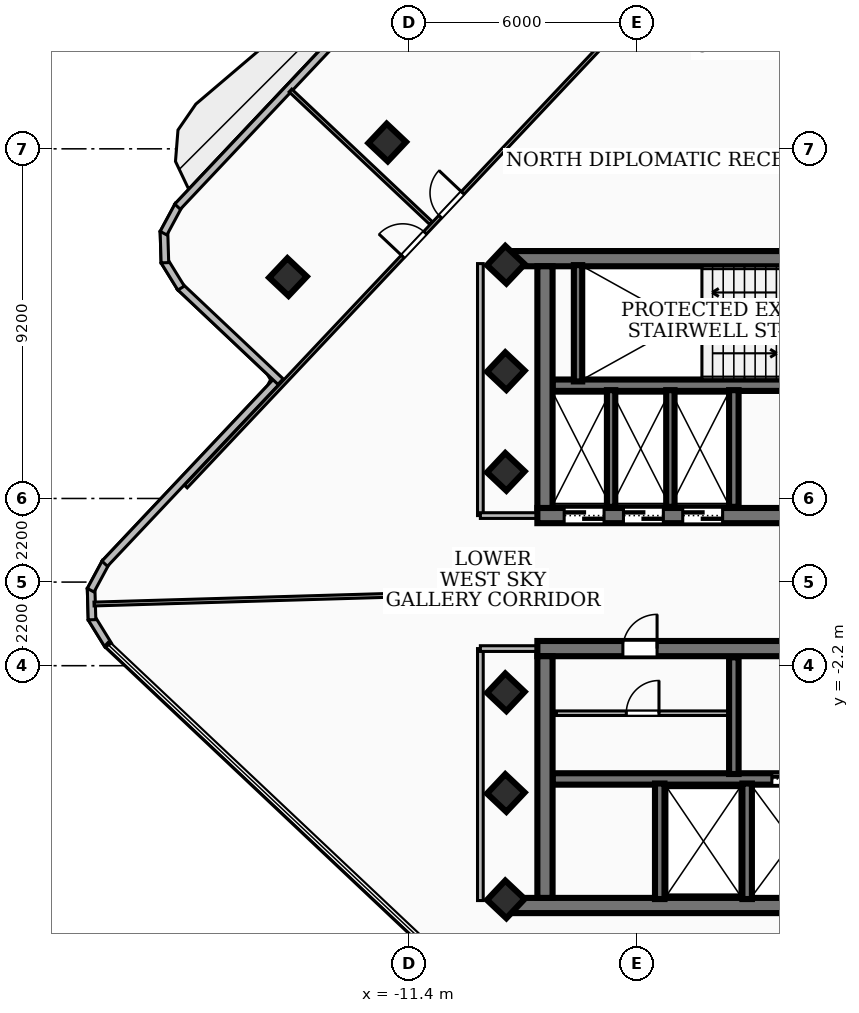
"""IFC4 building model, lengths in metres.
Left out: names, types, materials, properties, quantities, classifications, styles, units other than length and angle.
Written with IfcOpenShell. Run it as: python <this file> out.ifc"""

import sys

from ifc_helpers import new_model, si_unit, direction, frame, frame_2d, origin, origin_2d, place, context, subcontext, project, spatial, rectangle, extrude, element, fill, save


model = new_model("IFC4")
c1 = context("Model", 3, precision=1e-05, world=origin(), true_north=direction((0.0, 1.0)))
c2 = subcontext(c1, "Body", "Model", "MODEL_VIEW")
j1 = project(units=[si_unit("LENGTHUNIT", "METRE"), si_unit("PLANEANGLEUNIT", "RADIAN")], contexts=[c1])
p1 = place(None, origin())
s1 = spatial("IfcSite", under=j1, at=p1, CompositionType="ELEMENT")
p2 = place(p1, origin())
s2 = spatial("IfcBuilding", under=s1, at=p2, CompositionType="ELEMENT")
p3 = place(p2, frame((0.0, 0.0, 244.08)))
s3 = spatial("IfcBuildingStorey", under=s2, at=p3, CompositionType="ELEMENT", Elevation=244.08)
p4 = place(p3, frame((-8.78, 8.51, 0.0), z_axis=(0.0, 0.0, 1.0), x_axis=(1.0, 0.0, 0.0)))
e1 = element("IfcWall", 1, at=p4, inside=s3, PredefinedType="SHEAR", context=c2, shape_type="SweptSolid", body=[
    extrude(rectangle(XDim=17.56, YDim=0.4, at=frame_2d((8.78, 0.0))), origin(), (0.0, 0.0, 1.0), 3.16),
])
p5 = place(p3, frame((8.02, 1.75, 0.0), z_axis=(0.0, 0.0, 1.0), x_axis=(-1.0, 0.0, 0.0)))
e2 = element("IfcWall", 2, at=p5, inside=s3, PredefinedType="SHEAR", context=c2, shape_type="SweptSolid", body=[
    extrude(rectangle(XDim=16.04, YDim=0.4, at=frame_2d((8.02, 0.0))), origin(), (0.0, 0.0, 1.0), 3.16),
])
p6 = place(p5, frame((7.45, 0.0, 0.0)))
e3 = element("IfcOpeningElement", 3, at=p6, cuts=e2, PredefinedType="OPENING", context=c2, shape_type="SweptSolid", body=[
    extrude(rectangle(XDim=1.0, YDim=2.1, at=frame_2d((0.5, 1.05))), frame((0.0, 0.21, 0.0), z_axis=(0.0, -1.0, 0.0), x_axis=(1.0, 0.0, 0.0)), (0.0, 0.0, 1.0), 0.42),
])
p7 = place(p5, frame((14.285, 0.0, 0.0)))
e4 = element("IfcOpeningElement", 4, at=p7, cuts=e2, PredefinedType="OPENING", context=c2, shape_type="SweptSolid", body=[
    extrude(rectangle(XDim=1.05, YDim=2.15, at=frame_2d((0.525, 1.075))), frame((0.0, 0.21, 0.0), z_axis=(0.0, -1.0, 0.0), x_axis=(1.0, 0.0, 0.0)), (0.0, 0.0, 1.0), 0.42),
])
p8 = place(p5, frame((12.725, 0.0, 0.0)))
e5 = element("IfcOpeningElement", 5, at=p8, cuts=e2, PredefinedType="OPENING", context=c2, shape_type="SweptSolid", body=[
    extrude(rectangle(XDim=1.05, YDim=2.15, at=frame_2d((0.525, 1.075))), frame((0.0, 0.21, 0.0), z_axis=(0.0, -1.0, 0.0), x_axis=(1.0, 0.0, 0.0)), (0.0, 0.0, 1.0), 0.42),
])
p9 = place(p5, frame((11.165, 0.0, 0.0)))
e6 = element("IfcOpeningElement", 6, at=p9, cuts=e2, PredefinedType="OPENING", context=c2, shape_type="SweptSolid", body=[
    extrude(rectangle(XDim=1.05, YDim=2.15, at=frame_2d((0.525, 1.075))), frame((0.0, 0.21, 0.0), z_axis=(0.0, -1.0, 0.0), x_axis=(1.0, 0.0, 0.0)), (0.0, 0.0, 1.0), 0.42),
])
p10 = place(p5, frame((3.85, 0.0, 0.0)))
e7 = element("IfcOpeningElement", 7, at=p10, cuts=e2, PredefinedType="OPENING", context=c2, shape_type="SweptSolid", body=[
    extrude(rectangle(XDim=0.9, YDim=2.06, at=frame_2d((0.45, 1.03))), frame((0.0, 0.21, 0.0), z_axis=(0.0, -1.0, 0.0), x_axis=(1.0, 0.0, 0.0)), (0.0, 0.0, 1.0), 0.42),
])
p11 = place(p5, frame((2.35, 0.0, 0.0)))
e8 = element("IfcOpeningElement", 8, at=p11, cuts=e2, PredefinedType="OPENING", context=c2, shape_type="SweptSolid", body=[
    extrude(rectangle(XDim=0.9, YDim=2.06, at=frame_2d((0.45, 1.03))), frame((0.0, 0.21, 0.0), z_axis=(0.0, -1.0, 0.0), x_axis=(1.0, 0.0, 0.0)), (0.0, 0.0, 1.0), 0.42),
])
p12 = place(p5, frame((0.8, 0.0, 0.0)))
e9 = element("IfcOpeningElement", 9, at=p12, cuts=e2, PredefinedType="OPENING", context=c2, shape_type="SweptSolid", body=[
    extrude(rectangle(XDim=0.9, YDim=2.06, at=frame_2d((0.45, 1.03))), frame((0.0, 0.21, 0.0), z_axis=(0.0, -1.0, 0.0), x_axis=(1.0, 0.0, 0.0)), (0.0, 0.0, 1.0), 0.42),
])
p13 = place(p3, frame((-7.82, 1.95, 0.0), z_axis=(0.0, 0.0, 1.0), x_axis=(0.0, 1.0, 0.0)))
e10 = element("IfcWall", 10, at=p13, inside=s3, PredefinedType="SHEAR", context=c2, shape_type="SweptSolid", body=[
    extrude(rectangle(XDim=6.36, YDim=0.4, at=frame_2d((3.18, 0.0))), origin(), (0.0, 0.0, 1.0), 3.16),
])
p14 = place(p3, frame((7.62, 5.18, 0.0), z_axis=(0.0, 0.0, 1.0), x_axis=(-1.0, 0.0, 0.0)))
e11 = element("IfcWall", 11, at=p14, inside=s3, PredefinedType="SOLIDWALL", context=c2, shape_type="SweptSolid", body=[
    extrude(rectangle(XDim=15.24, YDim=0.3, at=frame_2d((7.62, 0.0))), origin(), (0.0, 0.0, 1.0), 3.16),
])
p15 = place(p14, frame((5.77, 0.0, 0.0)))
e12 = element("IfcOpeningElement", 12, at=p15, cuts=e11, PredefinedType="OPENING", context=c2, shape_type="SweptSolid", body=[
    extrude(rectangle(XDim=1.1, YDim=2.15, at=frame_2d((0.55, 1.075))), frame((0.0, 0.16, 0.0), z_axis=(0.0, -1.0, 0.0), x_axis=(1.0, 0.0, 0.0)), (0.0, 0.0, 1.0), 0.32),
])
p16 = place(p14, frame((2.97, 0.0, 0.0)))
e13 = element("IfcOpeningElement", 13, at=p16, cuts=e11, PredefinedType="OPENING", context=c2, shape_type="SweptSolid", body=[
    extrude(rectangle(XDim=1.1, YDim=2.15, at=frame_2d((0.55, 1.075))), frame((0.0, 0.16, 0.0), z_axis=(0.0, -1.0, 0.0), x_axis=(1.0, 0.0, 0.0)), (0.0, 0.0, 1.0), 0.32),
])
p17 = place(p14, frame((7.97, 0.0, 0.0)))
e14 = element("IfcOpeningElement", 14, at=p17, cuts=e11, PredefinedType="OPENING", context=c2, shape_type="SweptSolid", body=[
    extrude(rectangle(XDim=1.0, YDim=2.1, at=frame_2d((0.5, 1.05))), frame((0.0, 0.16, 0.0), z_axis=(0.0, -1.0, 0.0), x_axis=(1.0, 0.0, 0.0)), (0.0, 0.0, 1.0), 0.32),
])
p18 = place(p3, frame((8.78, -8.51, 0.0), z_axis=(0.0, 0.0, 1.0), x_axis=(-1.0, 0.0, 0.0)))
e15 = element("IfcWall", 15, at=p18, inside=s3, PredefinedType="SHEAR", context=c2, shape_type="SweptSolid", body=[
    extrude(rectangle(XDim=17.56, YDim=0.4, at=frame_2d((8.78, 0.0))), origin(), (0.0, 0.0, 1.0), 3.16),
])
p19 = place(p3, frame((-8.02, -1.75, 0.0), z_axis=(0.0, 0.0, 1.0), x_axis=(1.0, 0.0, 0.0)))
e16 = element("IfcWall", 16, at=p19, inside=s3, PredefinedType="SHEAR", context=c2, shape_type="SweptSolid", body=[
    extrude(rectangle(XDim=16.04, YDim=0.4, at=frame_2d((8.02, 0.0))), origin(), (0.0, 0.0, 1.0), 3.16),
])
p20 = place(p19, frame((7.45, 0.0, 0.0)))
e17 = element("IfcOpeningElement", 17, at=p20, cuts=e16, PredefinedType="OPENING", context=c2, shape_type="SweptSolid", body=[
    extrude(rectangle(XDim=1.0, YDim=2.1, at=frame_2d((0.5, 1.05))), frame((0.0, 0.21, 0.0), z_axis=(0.0, -1.0, 0.0), x_axis=(1.0, 0.0, 0.0)), (0.0, 0.0, 1.0), 0.42),
])
p21 = place(p19, frame((12.65, 0.0, 0.0)))
e18 = element("IfcOpeningElement", 18, at=p21, cuts=e16, PredefinedType="OPENING", context=c2, shape_type="SweptSolid", body=[
    extrude(rectangle(XDim=0.9, YDim=2.06, at=frame_2d((0.45, 1.03))), frame((0.0, 0.21, 0.0), z_axis=(0.0, -1.0, 0.0), x_axis=(1.0, 0.0, 0.0)), (0.0, 0.0, 1.0), 0.42),
])
p22 = place(p19, frame((2.25, 0.0, 0.0)))
e19 = element("IfcOpeningElement", 19, at=p22, cuts=e16, PredefinedType="OPENING", context=c2, shape_type="SweptSolid", body=[
    extrude(rectangle(XDim=0.9, YDim=2.06, at=frame_2d((0.45, 1.03))), frame((0.0, 0.21, 0.0), z_axis=(0.0, -1.0, 0.0), x_axis=(1.0, 0.0, 0.0)), (0.0, 0.0, 1.0), 0.42),
])
p23 = place(p3, frame((-7.82, -8.31, 0.0), z_axis=(0.0, 0.0, 1.0), x_axis=(0.0, 1.0, 0.0)))
e20 = element("IfcWall", 20, at=p23, inside=s3, PredefinedType="SHEAR", context=c2, shape_type="SweptSolid", body=[
    extrude(rectangle(XDim=6.36, YDim=0.4, at=frame_2d((3.18, 0.0))), origin(), (0.0, 0.0, 1.0), 3.16),
])
p24 = place(p3, frame((-7.62, -5.18, 0.0), z_axis=(0.0, 0.0, 1.0), x_axis=(1.0, 0.0, 0.0)))
e21 = element("IfcWall", 21, at=p24, inside=s3, PredefinedType="SOLIDWALL", context=c2, shape_type="SweptSolid", body=[
    extrude(rectangle(XDim=15.24, YDim=0.3, at=frame_2d((7.62, 0.0))), origin(), (0.0, 0.0, 1.0), 3.16),
])
p25 = place(p24, frame((5.77, 0.0, 0.0)))
e22 = element("IfcOpeningElement", 22, at=p25, cuts=e21, PredefinedType="OPENING", context=c2, shape_type="SweptSolid", body=[
    extrude(rectangle(XDim=1.1, YDim=2.15, at=frame_2d((0.55, 1.075))), frame((0.0, 0.16, 0.0), z_axis=(0.0, -1.0, 0.0), x_axis=(1.0, 0.0, 0.0)), (0.0, 0.0, 1.0), 0.32),
])
p26 = place(p24, frame((7.97, 0.0, 0.0)))
e23 = element("IfcOpeningElement", 23, at=p26, cuts=e21, PredefinedType="OPENING", context=c2, shape_type="SweptSolid", body=[
    extrude(rectangle(XDim=1.0, YDim=2.1, at=frame_2d((0.5, 1.05))), frame((0.0, 0.16, 0.0), z_axis=(0.0, -1.0, 0.0), x_axis=(1.0, 0.0, 0.0)), (0.0, 0.0, 1.0), 0.32),
])
p27 = place(p3, frame((-6.95, 5.28, 0.0), z_axis=(0.0, 0.0, 1.0), x_axis=(0.0, 1.0, 0.0)))
e24 = element("IfcWall", 24, at=p27, inside=s3, PredefinedType="SOLIDWALL", context=c2, shape_type="SweptSolid", body=[
    extrude(rectangle(XDim=3.06, YDim=0.22, at=frame_2d((1.53, 0.0))), origin(), (0.0, 0.0, 1.0), 3.16),
])
p28 = place(p3, frame((-2.85, 1.98, 0.0), z_axis=(0.0, 0.0, 1.0), x_axis=(0.0, 1.0, 0.0)))
e25 = element("IfcWall", 25, at=p28, inside=s3, PredefinedType="SOLIDWALL", context=c2, shape_type="SweptSolid", body=[
    extrude(rectangle(XDim=3.07, YDim=0.25, at=frame_2d((1.535, 0.0))), origin(), (0.0, 0.0, 1.0), 3.16),
])
for number, where, z_axis, x_axis in (
    (26, (-2.5, -8.34, 0.0), (0.0, 0.0, 1.0), (0.0, 1.0, 0.0)),
    (27, (-4.8, -8.34, 0.0), (0.0, 0.0, 1.0), (0.0, 1.0, 0.0)),
):
    element("IfcWall", number, at=place(p3, frame(where, z_axis=z_axis, x_axis=x_axis)), inside=s3, PredefinedType="SOLIDWALL", context=c2, shape_type="SweptSolid", body=[
        extrude(rectangle(XDim=3.04, YDim=0.25, at=frame_2d((1.52, 0.0))), origin(), (0.0, 0.0, 1.0), 3.16),
    ])
p29 = place(p3, frame((-2.85, -5.05, 0.0), z_axis=(0.0, 0.0, 1.0), x_axis=(0.0, 1.0, 0.0)))
e28 = element("IfcWall", 28, at=p29, inside=s3, PredefinedType="SOLIDWALL", context=c2, shape_type="SweptSolid", body=[
    extrude(rectangle(XDim=3.07, YDim=0.25, at=frame_2d((1.535, 0.0))), origin(), (0.0, 0.0, 1.0), 3.16),
])
for number, where, z_axis, x_axis in (
    (29, (-6.08, 1.98, 0.0), (0.0, 0.0, 1.0), (0.0, 1.0, 0.0)),
    (30, (-4.52, 1.98, 0.0), (0.0, 0.0, 1.0), (0.0, 1.0, 0.0)),
):
    element("IfcWall", number, at=place(p3, frame(where, z_axis=z_axis, x_axis=x_axis)), inside=s3, PredefinedType="SOLIDWALL", context=c2, shape_type="SweptSolid", body=[
        extrude(rectangle(XDim=3.07, YDim=0.22, at=frame_2d((1.535, 0.0))), origin(), (0.0, 0.0, 1.0), 3.16),
    ])
for number, where, z_axis, x_axis in (
    (31, (-8.85, -5.55, 0.0), (0.0, 0.0, 1.0), (0.686, 0.728, 0.0)),
    (32, (-8.85, -2.9, 0.0), (0.0, 0.0, 1.0), (0.686, 0.728, 0.0)),
    (33, (-8.85, 2.9, 0.0), (0.0, 0.0, 1.0), (0.686, 0.728, 0.0)),
    (34, (-8.85, 5.55, 0.0), (0.0, 0.0, 1.0), (0.686, 0.728, 0.0)),
    (35, (-8.85, 8.35, 0.0), (0.0, 0.0, 1.0), (0.686, 0.728, 0.0)),
    (36, (-8.85, -8.35, 0.0), (0.0, 0.0, 1.0), (0.686, 0.728, 0.0)),
    (37, (-11.971, 11.566, 0.0), (0.0, 0.0, 1.0), (0.686, 0.728, 0.0)),
    (38, (-14.583, 8.026, 0.0), (0.0, 0.0, 1.0), (0.686, 0.728, 0.0)),
):
    element("IfcColumn", number, at=place(p3, frame(where, z_axis=z_axis, x_axis=x_axis)), inside=s3, PredefinedType="COLUMN", context=c2, shape_type="SweptSolid", body=[
        extrude(rectangle(XDim=0.7, YDim=0.7, at=origin_2d()), origin(), (0.0, 0.0, 1.0), 3.42),
    ])
p30 = place(p3, frame((-19.313, -1.658, 0.0), z_axis=(0.0, 0.0, 1.0), x_axis=(-0.52517019965, 0.850997215859, 0.0)))
e39 = element("IfcWall", 39, at=p30, inside=s3, PredefinedType="SOLIDWALL", context=c2, shape_type="SweptSolid", body=[
    extrude(rectangle(XDim=0.838, YDim=0.2, at=frame_2d((0.419, 0.0))), origin(), (0.0, 0.0, 1.0), 3.16),
])
p31 = place(p3, frame((-19.739, -0.991, 0.0), z_axis=(0.0, 0.0, 1.0), x_axis=(-0.029024803491, 0.999578691641, 0.0)))
e40 = element("IfcWall", 40, at=p31, inside=s3, PredefinedType="SOLIDWALL", context=c2, shape_type="SweptSolid", body=[
    extrude(rectangle(XDim=0.824, YDim=0.2, at=frame_2d((0.412, 0.0))), origin(), (0.0, 0.0, 1.0), 3.16),
])
p32 = place(p3, frame((-19.774, -0.214, 0.0), z_axis=(0.0, 0.0, 1.0), x_axis=(0.474603278561, 0.880199822755, 0.0)))
e41 = element("IfcWall", 41, at=p32, inside=s3, PredefinedType="SOLIDWALL", context=c2, shape_type="SweptSolid", body=[
    extrude(rectangle(XDim=0.838, YDim=0.2, at=frame_2d((0.419, 0.0))), origin(), (0.0, 0.0, 1.0), 3.16),
])
p33 = place(p3, frame((-19.405, 0.484, 0.0), z_axis=(0.0, 0.0, 1.0), x_axis=(0.686028756372, 0.727574426042, 0.0)))
e42 = element("IfcWall", 42, at=p33, inside=s3, PredefinedType="SOLIDWALL", context=c2, shape_type="SweptSolid", body=[
    extrude(rectangle(XDim=6.74, YDim=0.2, at=frame_2d((3.37, 0.0))), origin(), (0.0, 0.0, 1.0), 3.16),
])
p34 = place(p3, frame((-14.778, 5.275, 0.0), z_axis=(0.0, 0.0, 1.0), x_axis=(-0.727262285553, 0.686359649172, 0.0)))
e43 = element("IfcWall", 43, at=p34, inside=s3, PredefinedType="SOLIDWALL", context=c2, shape_type="SweptSolid", body=[
    extrude(rectangle(XDim=3.641, YDim=0.2, at=frame_2d((1.82, 0.0))), origin(), (0.0, 0.0, 1.0), 3.16),
])
p35 = place(p3, frame((-17.395, 7.736, 0.0), z_axis=(0.0, 0.0, 1.0), x_axis=(-0.52517019965, 0.850997215859, 0.0)))
e44 = element("IfcWall", 44, at=p35, inside=s3, PredefinedType="SOLIDWALL", context=c2, shape_type="SweptSolid", body=[
    extrude(rectangle(XDim=0.838, YDim=0.2, at=frame_2d((0.419, 0.0))), origin(), (0.0, 0.0, 1.0), 3.16),
])
p36 = place(p3, frame((-17.821, 8.403, 0.0), z_axis=(0.0, 0.0, 1.0), x_axis=(-0.030208429442, 0.999543621255, 0.0)))
e45 = element("IfcWall", 45, at=p36, inside=s3, PredefinedType="SOLIDWALL", context=c2, shape_type="SweptSolid", body=[
    extrude(rectangle(XDim=0.824, YDim=0.2, at=frame_2d((0.412, 0.0))), origin(), (0.0, 0.0, 1.0), 3.16),
])
p37 = place(p3, frame((-17.857, 9.18, 0.0), z_axis=(0.0, 0.0, 1.0), x_axis=(0.474603278561, 0.880199822755, 0.0)))
e46 = element("IfcWall", 46, at=p37, inside=s3, PredefinedType="SOLIDWALL", context=c2, shape_type="SweptSolid", body=[
    extrude(rectangle(XDim=0.838, YDim=0.2, at=frame_2d((0.419, 0.0))), origin(), (0.0, 0.0, 1.0), 3.16),
])
p38 = place(p3, frame((-17.488, 9.878, 0.0), z_axis=(0.0, 0.0, 1.0), x_axis=(0.686075032126, 0.727530789928, 0.0)))
e47 = element("IfcWall", 47, at=p38, inside=s3, PredefinedType="SOLIDWALL", context=c2, shape_type="SweptSolid", body=[
    extrude(rectangle(XDim=9.623, YDim=0.2, at=frame_2d((4.812, 0.0))), origin(), (0.0, 0.0, 1.0), 3.16),
])
p39 = place(p38, frame((6.606, 0.0, 0.85)))
e48 = element("IfcOpeningElement", 48, at=p39, cuts=e47, PredefinedType="OPENING", context=c2, shape_type="SweptSolid", body=[
    extrude(rectangle(XDim=1.8, YDim=1.6, at=frame_2d((0.9, 0.8))), frame((0.0, 0.11, 0.0), z_axis=(0.0, -1.0, 0.0), x_axis=(1.0, 0.0, 0.0)), (0.0, 0.0, 1.0), 0.22),
])
p40 = place(p3, frame((-7.52, -3.45, 0.0), z_axis=(0.0, 0.0, 1.0), x_axis=(1.0, 0.0, 0.0)))
e49 = element("IfcWall", 49, at=p40, inside=s3, PredefinedType="PARTITIONING", context=c2, shape_type="SweptSolid", body=[
    extrude(rectangle(XDim=4.54, YDim=0.12, at=frame_2d((2.27, 0.0))), origin(), (0.0, 0.0, 1.0), 3.16),
])
p41 = place(p40, frame((1.84, 0.0, 0.0)))
e50 = element("IfcOpeningElement", 50, at=p41, cuts=e49, PredefinedType="OPENING", context=c2, shape_type="SweptSolid", body=[
    extrude(rectangle(XDim=0.86, YDim=2.04, at=frame_2d((0.43, 1.02))), frame((0.0, 0.07, 0.0), z_axis=(0.0, -1.0, 0.0), x_axis=(1.0, 0.0, 0.0)), (0.0, 0.0, 1.0), 0.14),
])
p42 = place(p3, frame((-9.52, 1.75, 0.0), z_axis=(0.0, 0.0, 1.0), x_axis=(0.0, 1.0, 0.0)))
e51 = element("IfcWall", 51, at=p42, inside=s3, PredefinedType="PARTITIONING", context=c2, shape_type="SweptSolid", body=[
    extrude(rectangle(XDim=6.63, YDim=0.15, at=frame_2d((3.315, 0.0))), origin(), (0.0, 0.0, 1.0), 2.53),
])
p43 = place(p3, frame((-7.85, 1.75, 0.0), z_axis=(0.0, 0.0, 1.0), x_axis=(-1.0, 0.0, 0.0)))
e52 = element("IfcWall", 52, at=p43, inside=s3, PredefinedType="PARTITIONING", context=c2, shape_type="SweptSolid", body=[
    extrude(rectangle(XDim=1.67, YDim=0.15, at=frame_2d((0.835, 0.0))), origin(), (0.0, 0.0, 1.0), 2.39),
])
p44 = place(p3, frame((-9.52, -8.38, 0.0), z_axis=(0.0, 0.0, 1.0), x_axis=(0.0, 1.0, 0.0)))
e53 = element("IfcWall", 53, at=p44, inside=s3, PredefinedType="PARTITIONING", context=c2, shape_type="SweptSolid", body=[
    extrude(rectangle(XDim=6.63, YDim=0.15, at=frame_2d((3.315, 0.0))), origin(), (0.0, 0.0, 1.0), 3.16),
])
p45 = place(p3, frame((-7.85, -1.75, 0.0), z_axis=(0.0, 0.0, 1.0), x_axis=(-1.0, 0.0, 0.0)))
e54 = element("IfcWall", 54, at=p45, inside=s3, PredefinedType="PARTITIONING", context=c2, shape_type="SweptSolid", body=[
    extrude(rectangle(XDim=1.67, YDim=0.15, at=frame_2d((0.835, 0.0))), origin(), (0.0, 0.0, 1.0), 2.39),
])
p46 = place(p3, frame((-11.395, -0.334, 0.0), z_axis=(0.0, 0.0, 1.0), x_axis=(-0.999571055306, -0.029286607775, 0.0)))
e55 = element("IfcWall", 55, at=p46, inside=s3, PredefinedType="PARTITIONING", context=c2, shape_type="SweptSolid", body=[
    extrude(rectangle(XDim=8.295, YDim=0.1, at=frame_2d((4.147, 0.0))), origin(), (0.0, 0.0, 1.0), 3.16),
])
p47 = place(p3, frame((-10.817, 9.445, 0.0), z_axis=(0.0, 0.0, 1.0), x_axis=(-0.727564075469, 0.686039733606, 0.0)))
e56 = element("IfcWall", 56, at=p47, inside=s3, PredefinedType="PARTITIONING", context=c2, shape_type="SweptSolid", body=[
    extrude(rectangle(XDim=5.086, YDim=0.1, at=frame_2d((2.543, 0.0))), origin(), (0.0, 0.0, 1.0), 3.16),
])
p48 = place(p3, frame((-17.271, 2.514, 0.0), z_axis=(0.0, 0.0, 1.0), x_axis=(0.686068145865, 0.727537283739, 0.0)))
e57 = element("IfcWall", 57, at=p48, inside=s3, PredefinedType="PARTITIONING", context=c2, shape_type="SweptSolid", body=[
    extrude(rectangle(XDim=20.04, YDim=0.1, at=frame_2d((10.02, 0.0))), origin(), (0.0, 0.0, 1.0), 2.53),
])
p49 = place(p48, frame((9.76, 0.0, 0.0)))
e58 = element("IfcOpeningElement", 58, at=p49, cuts=e57, PredefinedType="OPENING", context=c2, shape_type="SweptSolid", body=[
    extrude(rectangle(XDim=0.86, YDim=2.04, at=frame_2d((0.43, 1.02))), frame((0.0, 0.06, 0.0), z_axis=(0.0, -1.0, 0.0), x_axis=(1.0, 0.0, 0.0)), (0.0, 0.0, 1.0), 0.12),
])
p50 = place(p48, frame((8.32, 0.0, 0.0)))
e59 = element("IfcOpeningElement", 59, at=p50, cuts=e57, PredefinedType="OPENING", context=c2, shape_type="SweptSolid", body=[
    extrude(rectangle(XDim=0.86, YDim=2.04, at=frame_2d((0.43, 1.02))), frame((0.0, 0.06, 0.0), z_axis=(0.0, -1.0, 0.0), x_axis=(1.0, 0.0, 0.0)), (0.0, 0.0, 1.0), 0.12),
])
p51 = place(p25, origin())
e60 = element("IfcDoor", 60, at=p51, inside=s3, OperationType="DOUBLE_DOOR_SLIDING", PredefinedType="DOOR", context=c2, shape_type="SweptSolid", body=[
    extrude(rectangle(XDim=1.1, YDim=2.15, at=frame_2d((0.55, 1.075))), frame((0.0, 0.025, 0.0), z_axis=(0.0, -1.0, 0.0), x_axis=(1.0, 0.0, 0.0)), (0.0, 0.0, 1.0), 0.05),
])
fill(e22, e60)
p52 = place(p7, origin())
e61 = element("IfcDoor", 61, at=p52, inside=s3, OperationType="DOUBLE_DOOR_SLIDING", PredefinedType="DOOR", context=c2, shape_type="SweptSolid", body=[
    extrude(rectangle(XDim=1.05, YDim=2.15, at=frame_2d((0.525, 1.075))), frame((0.0, 0.025, 0.0), z_axis=(0.0, -1.0, 0.0), x_axis=(1.0, 0.0, 0.0)), (0.0, 0.0, 1.0), 0.05),
])
fill(e4, e61)
p53 = place(p8, origin())
e62 = element("IfcDoor", 62, at=p53, inside=s3, OperationType="DOUBLE_DOOR_SLIDING", PredefinedType="DOOR", context=c2, shape_type="SweptSolid", body=[
    extrude(rectangle(XDim=1.05, YDim=2.15, at=frame_2d((0.525, 1.075))), frame((0.0, 0.025, 0.0), z_axis=(0.0, -1.0, 0.0), x_axis=(1.0, 0.0, 0.0)), (0.0, 0.0, 1.0), 0.05),
])
fill(e5, e62)
p54 = place(p9, origin())
e63 = element("IfcDoor", 63, at=p54, inside=s3, OperationType="DOUBLE_DOOR_SLIDING", PredefinedType="DOOR", context=c2, shape_type="SweptSolid", body=[
    extrude(rectangle(XDim=1.05, YDim=2.15, at=frame_2d((0.525, 1.075))), frame((0.0, 0.025, 0.0), z_axis=(0.0, -1.0, 0.0), x_axis=(1.0, 0.0, 0.0)), (0.0, 0.0, 1.0), 0.05),
])
fill(e6, e63)
p55 = place(p22, origin())
e64 = element("IfcDoor", 64, at=p55, inside=s3, OperationType="SINGLE_SWING_RIGHT", PredefinedType="DOOR", context=c2, shape_type="SweptSolid", body=[
    extrude(rectangle(XDim=0.9, YDim=2.06, at=frame_2d((0.45, 1.03))), frame((0.0, 0.025, 0.0), z_axis=(0.0, -1.0, 0.0), x_axis=(1.0, 0.0, 0.0)), (0.0, 0.0, 1.0), 0.05),
])
fill(e19, e64)
p56 = place(p41, origin())
e65 = element("IfcDoor", 65, at=p56, inside=s3, OperationType="SINGLE_SWING_RIGHT", PredefinedType="DOOR", context=c2, shape_type="SweptSolid", body=[
    extrude(rectangle(XDim=0.86, YDim=2.04, at=frame_2d((0.43, 1.02))), frame((0.0, 0.025, 0.0), z_axis=(0.0, -1.0, 0.0), x_axis=(1.0, 0.0, 0.0)), (0.0, 0.0, 1.0), 0.05),
])
fill(e50, e65)
p57 = place(p49, origin())
e66 = element("IfcDoor", 66, at=p57, inside=s3, OperationType="SINGLE_SWING_RIGHT", PredefinedType="DOOR", context=c2, shape_type="SweptSolid", body=[
    extrude(rectangle(XDim=0.86, YDim=2.04, at=frame_2d((0.43, 1.02))), frame((0.0, 0.025, 0.0), z_axis=(0.0, -1.0, 0.0), x_axis=(1.0, 0.0, 0.0)), (0.0, 0.0, 1.0), 0.05),
])
fill(e58, e66)
p58 = place(p50, origin())
e67 = element("IfcDoor", 67, at=p58, inside=s3, OperationType="SINGLE_SWING_LEFT", PredefinedType="DOOR", context=c2, shape_type="SweptSolid", body=[
    extrude(rectangle(XDim=0.86, YDim=2.04, at=frame_2d((0.43, 1.02))), frame((0.0, 0.025, 0.0), z_axis=(0.0, -1.0, 0.0), x_axis=(1.0, 0.0, 0.0)), (0.0, 0.0, 1.0), 0.05),
])
fill(e59, e67)
save(model, sys.argv[1])
